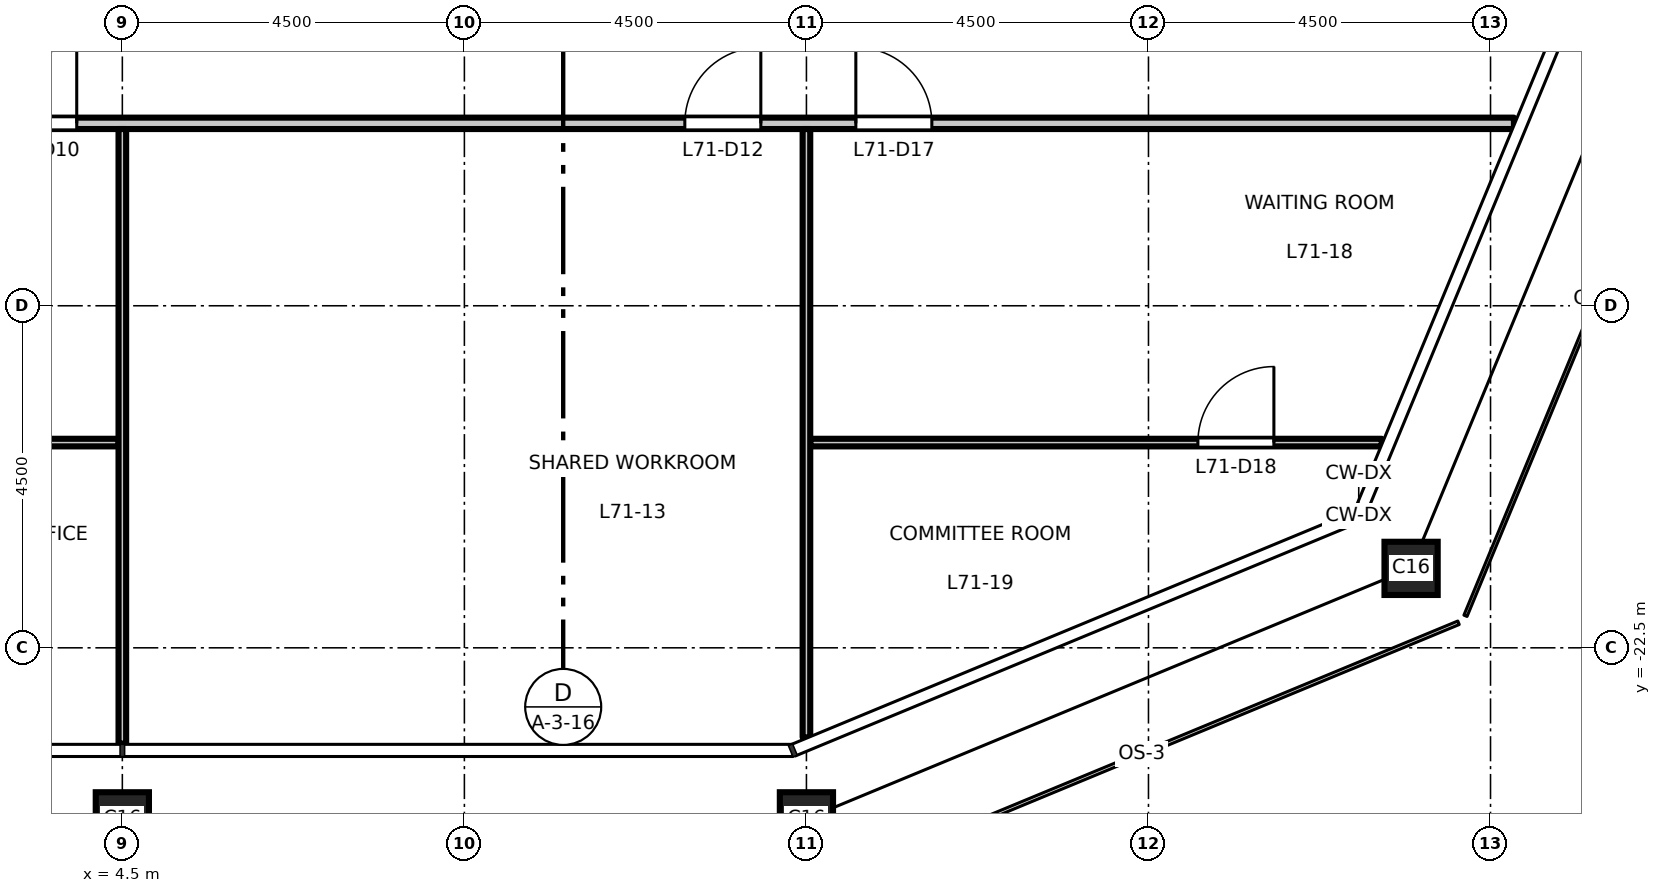
"""IFC4 building model, lengths in metres.
Left out: names, types, materials, properties, quantities, classifications, styles, units other than length and angle.
Written with IfcOpenShell. Run it as: python <this file> out.ifc"""

import sys

from ifc_helpers import new_model, si_unit, direction, frame, frame_2d, origin, origin_2d, place, context, subcontext, project, spatial, rectangle, hollow_rectangle, extrude, element, fill, save


model = new_model("IFC4")
c1 = context("Model", 3, precision=1e-05, world=origin(), true_north=direction((0.0, 1.0)))
c2 = subcontext(c1, "Body", "Model", "MODEL_VIEW")
j1 = project(units=[si_unit("LENGTHUNIT", "METRE"), si_unit("PLANEANGLEUNIT", "RADIAN")], contexts=[c1])
p1 = place(None, origin())
s1 = spatial("IfcSite", under=j1, at=p1, CompositionType="ELEMENT")
p2 = place(p1, origin())
s2 = spatial("IfcBuilding", under=s1, at=p2, CompositionType="ELEMENT")
p3 = place(p2, frame((0.0, 0.0, 330.2)))
s3 = spatial("IfcBuildingStorey", under=s2, at=p3, CompositionType="ELEMENT", Elevation=330.2)
for number, where, z_axis, x_axis in (
    (1, (4.5, -24.75, 0.0), (0.0, 0.0, 1.0), (1.0, 0.0, 0.0)),
    (2, (13.5, -24.75, 0.0), (0.0, 0.0, 1.0), (1.0, 0.0, 0.0)),
    (3, (21.455, -21.455, 0.0), (0.0, 0.0, 1.0), (1.0, 0.0, 0.0)),
):
    element("IfcColumn", number, at=place(p3, frame(where, z_axis=z_axis, x_axis=x_axis)), inside=s3, PredefinedType="COLUMN", context=c2, shape_type="SweptSolid", body=[
        extrude(hollow_rectangle(XDim=0.7, YDim=0.7, WallThickness=0.036, at=origin_2d()), origin(), (0.0, 0.0, 1.0), 4.5),
    ])
p4 = place(p3, frame((-4.45, -19.8, 0.0), z_axis=(0.0, 0.0, 1.0), x_axis=(1.0, 0.0, 0.0)))
e4 = element("IfcWall", 4, at=p4, inside=s3, PredefinedType="PARTITIONING", context=c2, shape_type="SweptSolid", body=[
    extrude(rectangle(XDim=8.9, YDim=0.1, at=frame_2d((4.45, 0.0))), origin(), (0.0, 0.0, 1.0), 4.35),
])
p5 = place(p4, frame((0.6, 0.0, 0.0)))
e5 = element("IfcOpeningElement", 5, at=p5, cuts=e4, PredefinedType="OPENING", context=c2, shape_type="SweptSolid", body=[
    extrude(rectangle(XDim=1.0, YDim=2.1, at=frame_2d((0.5, 1.05))), frame((0.0, 0.06, 0.0), z_axis=(0.0, -1.0, 0.0), x_axis=(1.0, 0.0, 0.0)), (0.0, 0.0, 1.0), 0.12),
])
p6 = place(p3, frame((13.55, -19.8, 0.0), z_axis=(0.0, 0.0, 1.0), x_axis=(1.0, 0.0, 0.0)))
e6 = element("IfcWall", 6, at=p6, inside=s3, PredefinedType="PARTITIONING", context=c2, shape_type="SweptSolid", body=[
    extrude(rectangle(XDim=7.519, YDim=0.1, at=frame_2d((3.76, 0.0))), origin(), (0.0, 0.0, 1.0), 4.35),
])
p7 = place(p6, frame((5.1, 0.0, 0.0)))
e7 = element("IfcOpeningElement", 7, at=p7, cuts=e6, PredefinedType="OPENING", context=c2, shape_type="SweptSolid", body=[
    extrude(rectangle(XDim=1.0, YDim=2.1, at=frame_2d((0.5, 1.05))), frame((0.0, 0.06, 0.0), z_axis=(0.0, -1.0, 0.0), x_axis=(1.0, 0.0, 0.0)), (0.0, 0.0, 1.0), 0.12),
])
p8 = place(p3, frame((-22.808, -15.6, 0.0), z_axis=(0.0, 0.0, 1.0), x_axis=(1.0, 0.0, 0.0)))
e8 = element("IfcWall", 8, at=p8, inside=s3, PredefinedType="PARTITIONING", context=c2, shape_type="SweptSolid", body=[
    extrude(rectangle(XDim=45.616, YDim=0.15, at=frame_2d((22.808, 0.0))), origin(), (0.0, 0.0, 1.0), 4.35),
])
p9 = place(p8, frame((16.708, 0.0, 0.0)))
e9 = element("IfcOpeningElement", 9, at=p9, cuts=e8, PredefinedType="OPENING", context=c2, shape_type="SweptSolid", body=[
    extrude(rectangle(XDim=1.0, YDim=2.1, at=frame_2d((0.5, 1.05))), frame((0.0, 0.085, 0.0), z_axis=(0.0, -1.0, 0.0), x_axis=(1.0, 0.0, 0.0)), (0.0, 0.0, 1.0), 0.17),
])
p10 = place(p8, frame((25.708, 0.0, 0.0)))
e10 = element("IfcOpeningElement", 10, at=p10, cuts=e8, PredefinedType="OPENING", context=c2, shape_type="SweptSolid", body=[
    extrude(rectangle(XDim=1.0, YDim=2.1, at=frame_2d((0.5, 1.05))), frame((0.0, 0.085, 0.0), z_axis=(0.0, -1.0, 0.0), x_axis=(1.0, 0.0, 0.0)), (0.0, 0.0, 1.0), 0.17),
])
p11 = place(p8, frame((34.708, 0.0, 0.0)))
e11 = element("IfcOpeningElement", 11, at=p11, cuts=e8, PredefinedType="OPENING", context=c2, shape_type="SweptSolid", body=[
    extrude(rectangle(XDim=1.0, YDim=2.1, at=frame_2d((0.5, 1.05))), frame((0.0, 0.085, 0.0), z_axis=(0.0, -1.0, 0.0), x_axis=(1.0, 0.0, 0.0)), (0.0, 0.0, 1.0), 0.17),
])
p12 = place(p8, frame((0.65, 0.0, 0.0)))
e12 = element("IfcOpeningElement", 12, at=p12, cuts=e8, PredefinedType="OPENING", context=c2, shape_type="SweptSolid", body=[
    extrude(rectangle(XDim=1.0, YDim=2.1, at=frame_2d((0.5, 1.05))), frame((0.0, 0.085, 0.0), z_axis=(0.0, -1.0, 0.0), x_axis=(1.0, 0.0, 0.0)), (0.0, 0.0, 1.0), 0.17),
])
p13 = place(p8, frame((36.958, 0.0, 0.0)))
e13 = element("IfcOpeningElement", 13, at=p13, cuts=e8, PredefinedType="OPENING", context=c2, shape_type="SweptSolid", body=[
    extrude(rectangle(XDim=1.0, YDim=2.1, at=frame_2d((0.5, 1.05))), frame((0.0, 0.085, 0.0), z_axis=(0.0, -1.0, 0.0), x_axis=(1.0, 0.0, 0.0)), (0.0, 0.0, 1.0), 0.17),
])
p14 = place(p3, frame((4.5, -23.76, 0.0), z_axis=(0.0, 0.0, 1.0), x_axis=(0.0, 1.0, 0.0)))
e14 = element("IfcWall", 14, at=p14, inside=s3, PredefinedType="PARTITIONING", context=c2, shape_type="SweptSolid", body=[
    extrude(rectangle(XDim=8.085, YDim=0.1, at=frame_2d((4.042, 0.0))), origin(), (0.0, 0.0, 1.0), 3.65),
])
p15 = place(p3, frame((13.5, -23.678, 0.0), z_axis=(0.0, 0.0, 1.0), x_axis=(0.0, 1.0, 0.0)))
e15 = element("IfcWall", 15, at=p15, inside=s3, PredefinedType="PARTITIONING", context=c2, shape_type="SweptSolid", body=[
    extrude(rectangle(XDim=8.003, YDim=0.1, at=frame_2d((4.001, 0.0))), origin(), (0.0, 0.0, 1.0), 3.75),
])
p16 = place(p10, origin())
e16 = element("IfcDoor", 16, at=p16, inside=s3, OperationType="SINGLE_SWING_RIGHT", PredefinedType="DOOR", context=c2, shape_type="SweptSolid", body=[
    extrude(rectangle(XDim=1.0, YDim=2.1, at=frame_2d((0.5, 1.05))), frame((0.0, 0.025, 0.0), z_axis=(0.0, -1.0, 0.0), x_axis=(1.0, 0.0, 0.0)), (0.0, 0.0, 1.0), 0.05),
])
fill(e10, e16)
p17 = place(p11, origin())
e17 = element("IfcDoor", 17, at=p17, inside=s3, OperationType="SINGLE_SWING_RIGHT", PredefinedType="DOOR", context=c2, shape_type="SweptSolid", body=[
    extrude(rectangle(XDim=1.0, YDim=2.1, at=frame_2d((0.5, 1.05))), frame((0.0, 0.025, 0.0), z_axis=(0.0, -1.0, 0.0), x_axis=(1.0, 0.0, 0.0)), (0.0, 0.0, 1.0), 0.05),
])
fill(e11, e17)
p18 = place(p13, origin())
e18 = element("IfcDoor", 18, at=p18, inside=s3, OperationType="SINGLE_SWING_LEFT", PredefinedType="DOOR", context=c2, shape_type="SweptSolid", body=[
    extrude(rectangle(XDim=1.0, YDim=2.1, at=frame_2d((0.5, 1.05))), frame((0.0, 0.025, 0.0), z_axis=(0.0, -1.0, 0.0), x_axis=(1.0, 0.0, 0.0)), (0.0, 0.0, 1.0), 0.05),
])
fill(e13, e18)
p19 = place(p7, origin())
e19 = element("IfcDoor", 19, at=p19, inside=s3, OperationType="SINGLE_SWING_RIGHT", PredefinedType="DOOR", context=c2, shape_type="SweptSolid", body=[
    extrude(rectangle(XDim=1.0, YDim=2.1, at=frame_2d((0.5, 1.05))), frame((0.0, 0.025, 0.0), z_axis=(0.0, -1.0, 0.0), x_axis=(1.0, 0.0, 0.0)), (0.0, 0.0, 1.0), 0.05),
])
fill(e7, e19)
save(model, sys.argv[1])
